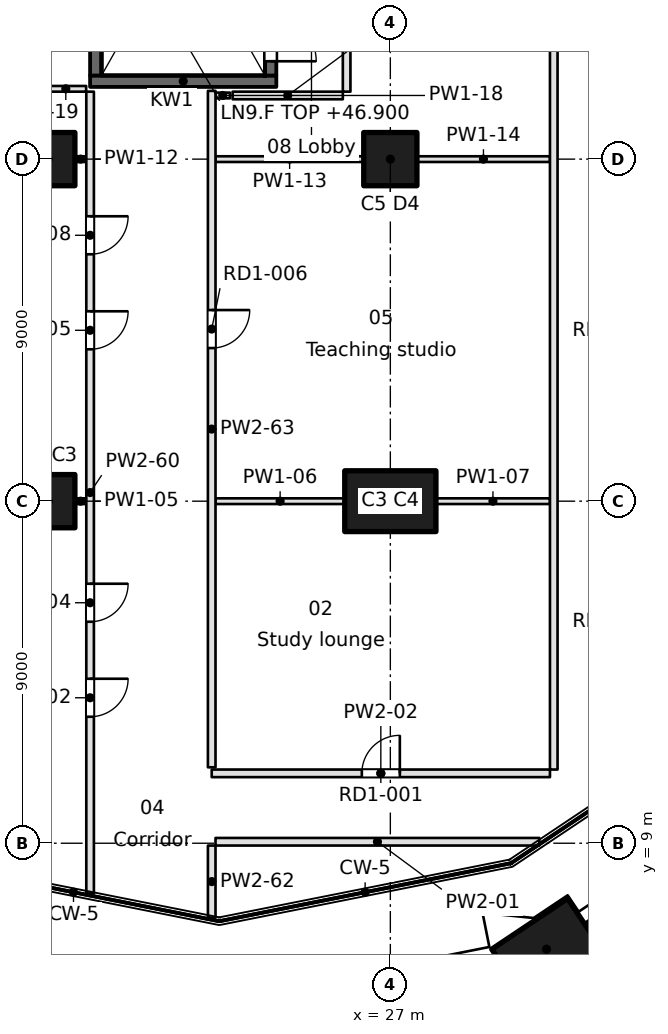
"""IFC4 building model, lengths in metres.
Left out: names, types, materials, properties, quantities, classifications, styles, units other than length and angle.
Written with IfcOpenShell. Run it as: python <this file> out.ifc"""

import sys

from ifc_helpers import new_model, si_unit, direction, frame, frame_2d, origin, origin_2d, place, context, subcontext, project, spatial, rectangle, extrude, element, fill, save


model = new_model("IFC4")
c1 = context("Model", 3, precision=1e-05, world=origin(), true_north=direction((0.0, 1.0)))
c2 = subcontext(c1, "Body", "Model", "MODEL_VIEW")
j1 = project(units=[si_unit("LENGTHUNIT", "METRE"), si_unit("PLANEANGLEUNIT", "RADIAN")], contexts=[c1])
p1 = place(None, origin())
s1 = spatial("IfcSite", under=j1, at=p1, CompositionType="ELEMENT")
p2 = place(p1, origin())
s2 = spatial("IfcBuilding", under=s1, at=p2, CompositionType="ELEMENT")
p3 = place(p2, frame((0.0, 0.0, 46.9)))
s3 = spatial("IfcBuildingStorey", under=s2, at=p3, CompositionType="ELEMENT", Elevation=46.9)
p4 = place(p3, frame((31.11, 6.213, 0.0), z_axis=(0.0, 0.0, 1.0), x_axis=(0.831469612303, 0.55557023302, 0.0)))
e1 = element("IfcColumn", 1, at=p4, inside=s3, PredefinedType="COLUMN", context=c2, shape_type="SweptSolid", body=[
    extrude(rectangle(XDim=2.4, YDim=1.6, at=origin_2d()), origin(), (0.0, 0.0, 1.0), 3.7),
])
for number, where, z_axis, x_axis in (
    (2, (18.0, 18.0, 0.0), (0.0, 0.0, 1.0), (1.0, 0.0, 0.0)),
    (3, (18.0, 27.0, 0.0), (0.0, 0.0, 1.0), (1.0, 0.0, 0.0)),
):
    element("IfcColumn", number, at=place(p3, frame(where, z_axis=z_axis, x_axis=x_axis)), inside=s3, PredefinedType="COLUMN", context=c2, shape_type="SweptSolid", body=[
        extrude(rectangle(XDim=1.4, YDim=1.4, at=origin_2d()), origin(), (0.0, 0.0, 1.0), 3.7),
    ])
p5 = place(p3, frame((27.0, 18.0, 0.0), z_axis=(0.0, 0.0, 1.0), x_axis=(1.0, 0.0, 0.0)))
e4 = element("IfcColumn", 4, at=p5, inside=s3, PredefinedType="COLUMN", context=c2, shape_type="SweptSolid", body=[
    extrude(rectangle(XDim=2.4, YDim=1.6, at=origin_2d()), origin(), (0.0, 0.0, 1.0), 3.7),
])
p6 = place(p3, frame((27.0, 27.0, 0.0), z_axis=(0.0, 0.0, 1.0), x_axis=(1.0, 0.0, 0.0)))
e5 = element("IfcColumn", 5, at=p6, inside=s3, PredefinedType="COLUMN", context=c2, shape_type="SweptSolid", body=[
    extrude(rectangle(XDim=1.4, YDim=1.4, at=origin_2d()), origin(), (0.0, 0.0, 1.0), 3.7),
])
p7 = place(p3, frame((19.1, 29.05, -0.4), z_axis=(0.0, 0.0, 1.0), x_axis=(1.0, 0.0, 0.0)))
e6 = element("IfcWall", 6, at=p7, inside=s3, PredefinedType="SOLIDWALL", context=c2, shape_type="SweptSolid", body=[
    extrude(rectangle(XDim=4.9, YDim=0.3, at=frame_2d((2.45, 0.0))), origin(), (0.0, 0.0, 1.0), 3.7),
])
p8 = place(p3, frame((19.25, 29.2, -0.4), z_axis=(0.0, 0.0, 1.0), x_axis=(0.0, 1.0, 0.0)))
e7 = element("IfcWall", 7, at=p8, inside=s3, PredefinedType="SOLIDWALL", context=c2, shape_type="SweptSolid", body=[
    extrude(rectangle(XDim=7.6, YDim=0.3, at=frame_2d((3.8, 0.0))), origin(), (0.0, 0.0, 1.0), 3.7),
])
p9 = place(p3, frame((23.85, 29.2, -0.4), z_axis=(0.0, 0.0, 1.0), x_axis=(0.0, 1.0, 0.0)))
e8 = element("IfcWall", 8, at=p9, inside=s3, PredefinedType="SOLIDWALL", context=c2, shape_type="SweptSolid", body=[
    extrude(rectangle(XDim=7.6, YDim=0.3, at=frame_2d((3.8, 0.0))), origin(), (0.0, 0.0, 1.0), 3.7),
])
p10 = place(p9, frame((0.375, 0.0, 0.4)))
e9 = element("IfcOpeningElement", 9, at=p10, cuts=e8, PredefinedType="OPENING", context=c2, shape_type="SweptSolid", body=[
    extrude(rectangle(XDim=1.2, YDim=2.1, at=frame_2d((0.6, 1.05))), frame((0.0, 0.15, 0.0), z_axis=(0.0, -1.0, 0.0), x_axis=(1.0, 0.0, 0.0)), (0.0, 0.0, 1.0), 0.3),
])
p11 = place(p3, frame((30.921, 9.039, 0.0), z_axis=(0.0, 0.0, 1.0), x_axis=(-1.0, 0.0, 0.0)))
e10 = element("IfcWall", 10, at=p11, inside=s3, PredefinedType="PARTITIONING", context=c2, shape_type="SweptSolid", body=[
    extrude(rectangle(XDim=8.521, YDim=0.2, at=frame_2d((4.261, 0.0))), origin(), (0.0, 0.0, 1.0), 3.3),
])
p12 = place(p3, frame((22.3, 10.839, 0.0), z_axis=(0.0, 0.0, 1.0), x_axis=(1.0, 0.0, 0.0)))
e11 = element("IfcWall", 11, at=p12, inside=s3, PredefinedType="PARTITIONING", context=c2, shape_type="SweptSolid", body=[
    extrude(rectangle(XDim=8.9, YDim=0.2, at=frame_2d((4.45, 0.0))), origin(), (0.0, 0.0, 1.0), 3.3),
])
p13 = place(p12, frame((3.95, 0.0, 0.0)))
e12 = element("IfcOpeningElement", 12, at=p13, cuts=e11, PredefinedType="OPENING", context=c2, shape_type="SweptSolid", body=[
    extrude(rectangle(XDim=1.0, YDim=2.1, at=frame_2d((0.5, 1.05))), frame((0.0, 0.1, 0.0), z_axis=(0.0, -1.0, 0.0), x_axis=(1.0, 0.0, 0.0)), (0.0, 0.0, 1.0), 0.2),
])
p14 = place(p3, frame((18.7, 18.0, 0.0), z_axis=(0.0, 0.0, 1.0), x_axis=(1.0, 0.0, 0.0)))
e13 = element("IfcWall", 13, at=p14, inside=s3, PredefinedType="PARTITIONING", context=c2, shape_type="SweptSolid", body=[
    extrude(rectangle(XDim=0.3, YDim=0.15, at=frame_2d((0.15, 0.0))), origin(), (0.0, 0.0, 1.0), 3.3),
])
p15 = place(p3, frame((22.4, 18.0, 0.0), z_axis=(0.0, 0.0, 1.0), x_axis=(1.0, 0.0, 0.0)))
e14 = element("IfcWall", 14, at=p15, inside=s3, PredefinedType="PARTITIONING", context=c2, shape_type="SweptSolid", body=[
    extrude(rectangle(XDim=3.4, YDim=0.15, at=frame_2d((1.7, 0.0))), origin(), (0.0, 0.0, 1.0), 3.3),
])
p16 = place(p3, frame((28.2, 18.0, 0.0), z_axis=(0.0, 0.0, 1.0), x_axis=(1.0, 0.0, 0.0)))
e15 = element("IfcWall", 15, at=p16, inside=s3, PredefinedType="PARTITIONING", context=c2, shape_type="SweptSolid", body=[
    extrude(rectangle(XDim=3.0, YDim=0.15, at=frame_2d((1.5, 0.0))), origin(), (0.0, 0.0, 1.0), 3.3),
])
p17 = place(p3, frame((18.7, 27.0, 0.0), z_axis=(0.0, 0.0, 1.0), x_axis=(1.0, 0.0, 0.0)))
e16 = element("IfcWall", 16, at=p17, inside=s3, PredefinedType="PARTITIONING", context=c2, shape_type="SweptSolid", body=[
    extrude(rectangle(XDim=0.3, YDim=0.15, at=frame_2d((0.15, 0.0))), origin(), (0.0, 0.0, 1.0), 3.3),
])
p18 = place(p3, frame((22.4, 27.0, 0.0), z_axis=(0.0, 0.0, 1.0), x_axis=(1.0, 0.0, 0.0)))
e17 = element("IfcWall", 17, at=p18, inside=s3, PredefinedType="PARTITIONING", context=c2, shape_type="SweptSolid", body=[
    extrude(rectangle(XDim=3.9, YDim=0.15, at=frame_2d((1.95, 0.0))), origin(), (0.0, 0.0, 1.0), 3.3),
])
p19 = place(p3, frame((27.7, 27.0, 0.0), z_axis=(0.0, 0.0, 1.0), x_axis=(1.0, 0.0, 0.0)))
e18 = element("IfcWall", 18, at=p19, inside=s3, PredefinedType="PARTITIONING", context=c2, shape_type="SweptSolid", body=[
    extrude(rectangle(XDim=3.5, YDim=0.15, at=frame_2d((1.75, 0.0))), origin(), (0.0, 0.0, 1.0), 3.3),
])
p20 = place(p3, frame((25.75, 28.675, 0.0), z_axis=(0.0, 0.0, 1.0), x_axis=(-1.0, 0.0, 0.0)))
e19 = element("IfcWall", 19, at=p20, inside=s3, PredefinedType="PARTITIONING", context=c2, shape_type="SweptSolid", body=[
    extrude(rectangle(XDim=2.9, YDim=0.2, at=frame_2d((1.45, 0.0))), origin(), (0.0, 0.0, 1.0), 3.3),
])
p21 = place(p3, frame((22.4, 28.675, 0.0), z_axis=(0.0, 0.0, 1.0), x_axis=(1.0, 0.0, 0.0)))
e20 = element("IfcWall", 20, at=p21, inside=s3, PredefinedType="PARTITIONING", context=c2, shape_type="SweptSolid", body=[
    extrude(rectangle(XDim=0.38, YDim=0.15, at=frame_2d((0.19, 0.0))), origin(), (0.0, 0.0, 1.0), 3.3),
])
p22 = place(p3, frame((17.925, 28.85, 0.0), z_axis=(0.0, 0.0, 1.0), x_axis=(1.0, 0.0, 0.0)))
e21 = element("IfcWall", 21, at=p22, inside=s3, PredefinedType="PARTITIONING", context=c2, shape_type="SweptSolid", body=[
    extrude(rectangle(XDim=1.071, YDim=0.15, at=frame_2d((0.536, 0.0))), origin(), (0.0, 0.0, 1.0), 3.3),
])
p23 = place(p3, frame((19.1, 7.679, 0.0), z_axis=(0.0, 0.0, 1.0), x_axis=(0.0, 1.0, 0.0)))
e22 = element("IfcWall", 22, at=p23, inside=s3, PredefinedType="PARTITIONING", context=c2, shape_type="SweptSolid", body=[
    extrude(rectangle(XDim=21.095, YDim=0.2, at=frame_2d((10.548, 0.0))), origin(), (0.0, 0.0, 1.0), 3.3),
])
p24 = place(p23, frame((4.648, 0.0, 0.0)))
e23 = element("IfcOpeningElement", 23, at=p24, cuts=e22, PredefinedType="OPENING", context=c2, shape_type="SweptSolid", body=[
    extrude(rectangle(XDim=1.0, YDim=2.1, at=frame_2d((0.5, 1.05))), frame((0.0, 0.1, 0.0), z_axis=(0.0, -1.0, 0.0), x_axis=(1.0, 0.0, 0.0)), (0.0, 0.0, 1.0), 0.2),
])
p25 = place(p23, frame((7.148, 0.0, 0.0)))
e24 = element("IfcOpeningElement", 24, at=p25, cuts=e22, PredefinedType="OPENING", context=c2, shape_type="SweptSolid", body=[
    extrude(rectangle(XDim=1.0, YDim=2.1, at=frame_2d((0.5, 1.05))), frame((0.0, 0.1, 0.0), z_axis=(0.0, -1.0, 0.0), x_axis=(1.0, 0.0, 0.0)), (0.0, 0.0, 1.0), 0.2),
])
p26 = place(p23, frame((14.317, 0.0, 0.0)))
e25 = element("IfcOpeningElement", 25, at=p26, cuts=e22, PredefinedType="OPENING", context=c2, shape_type="SweptSolid", body=[
    extrude(rectangle(XDim=1.0, YDim=2.1, at=frame_2d((0.5, 1.05))), frame((0.0, 0.1, 0.0), z_axis=(0.0, -1.0, 0.0), x_axis=(1.0, 0.0, 0.0)), (0.0, 0.0, 1.0), 0.2),
])
p27 = place(p23, frame((16.817, 0.0, 0.0)))
e26 = element("IfcOpeningElement", 26, at=p27, cuts=e22, PredefinedType="OPENING", context=c2, shape_type="SweptSolid", body=[
    extrude(rectangle(XDim=1.0, YDim=2.1, at=frame_2d((0.5, 1.05))), frame((0.0, 0.1, 0.0), z_axis=(0.0, -1.0, 0.0), x_axis=(1.0, 0.0, 0.0)), (0.0, 0.0, 1.0), 0.2),
])
p28 = place(p3, frame((22.3, 8.939, 0.0), z_axis=(0.0, 0.0, 1.0), x_axis=(0.0, -1.0, 0.0)))
e27 = element("IfcWall", 27, at=p28, inside=s3, PredefinedType="PARTITIONING", context=c2, shape_type="SweptSolid", body=[
    extrude(rectangle(XDim=1.896, YDim=0.2, at=frame_2d((0.948, 0.0))), origin(), (0.0, 0.0, 1.0), 3.3),
])
p29 = place(p3, frame((22.3, 28.796, 0.0), z_axis=(0.0, 0.0, 1.0), x_axis=(0.0, -1.0, 0.0)))
e28 = element("IfcWall", 28, at=p29, inside=s3, PredefinedType="PARTITIONING", context=c2, shape_type="SweptSolid", body=[
    extrude(rectangle(XDim=17.798, YDim=0.2, at=frame_2d((8.899, 0.0))), origin(), (0.0, 0.0, 1.0), 3.3),
])
p30 = place(p29, frame((5.767, 0.0, 0.0)))
e29 = element("IfcOpeningElement", 29, at=p30, cuts=e28, PredefinedType="OPENING", context=c2, shape_type="SweptSolid", body=[
    extrude(rectangle(XDim=1.0, YDim=2.1, at=frame_2d((0.5, 1.05))), frame((0.0, 0.1, 0.0), z_axis=(0.0, -1.0, 0.0), x_axis=(1.0, 0.0, 0.0)), (0.0, 0.0, 1.0), 0.2),
])
p31 = place(p3, frame((25.85, 31.575, 0.0), z_axis=(0.0, 0.0, 1.0), x_axis=(0.0, -1.0, 0.0)))
e30 = element("IfcWall", 30, at=p31, inside=s3, PredefinedType="PARTITIONING", context=c2, shape_type="SweptSolid", body=[
    extrude(rectangle(XDim=2.8, YDim=0.2, at=frame_2d((1.4, 0.0))), origin(), (0.0, 0.0, 1.0), 3.3),
])
p32 = place(p3, frame((31.3, 10.939, 0.0), z_axis=(0.0, 0.0, 1.0), x_axis=(0.0, 1.0, 0.0)))
e31 = element("IfcWall", 31, at=p32, inside=s3, PredefinedType="PARTITIONING", context=c2, shape_type="SweptSolid", body=[
    extrude(rectangle(XDim=48.861, YDim=0.2, at=frame_2d((24.431, 0.0))), origin(), (0.0, 0.0, 1.0), 3.3),
])
p33 = place(p32, frame((20.047, 0.0, 0.0)))
e32 = element("IfcOpeningElement", 32, at=p33, cuts=e31, PredefinedType="OPENING", context=c2, shape_type="SweptSolid", body=[
    extrude(rectangle(XDim=1.0, YDim=2.1, at=frame_2d((0.5, 1.05))), frame((0.0, 0.1, 0.0), z_axis=(0.0, -1.0, 0.0), x_axis=(1.0, 0.0, 0.0)), (0.0, 0.0, 1.0), 0.2),
])
p34 = place(p32, frame((29.067, 0.0, 0.0)))
e33 = element("IfcOpeningElement", 33, at=p34, cuts=e31, PredefinedType="OPENING", context=c2, shape_type="SweptSolid", body=[
    extrude(rectangle(XDim=1.0, YDim=2.1, at=frame_2d((0.5, 1.05))), frame((0.0, 0.1, 0.0), z_axis=(0.0, -1.0, 0.0), x_axis=(1.0, 0.0, 0.0)), (0.0, 0.0, 1.0), 0.2),
])
p35 = place(p10, frame((1.2, 0.0, 0.0), z_axis=(0.0, 0.0, 1.0), x_axis=(-1.0, 0.0, 0.0)))
e34 = element("IfcDoor", 34, at=p35, inside=s3, OperationType="SINGLE_SWING_RIGHT", PredefinedType="DOOR", context=c2, shape_type="SweptSolid", body=[
    extrude(rectangle(XDim=1.2, YDim=2.1, at=frame_2d((0.6, 1.05))), frame((0.0, 0.025, 0.0), z_axis=(0.0, -1.0, 0.0), x_axis=(1.0, 0.0, 0.0)), (0.0, 0.0, 1.0), 0.05),
])
fill(e9, e34)
p36 = place(p13, origin())
e35 = element("IfcDoor", 35, at=p36, inside=s3, OperationType="SINGLE_SWING_RIGHT", PredefinedType="DOOR", context=c2, shape_type="SweptSolid", body=[
    extrude(rectangle(XDim=1.0, YDim=2.1, at=frame_2d((0.5, 1.05))), frame((0.0, 0.025, 0.0), z_axis=(0.0, -1.0, 0.0), x_axis=(1.0, 0.0, 0.0)), (0.0, 0.0, 1.0), 0.05),
])
fill(e12, e35)
p37 = place(p24, frame((1.0, 0.0, 0.0), z_axis=(0.0, 0.0, 1.0), x_axis=(-1.0, 0.0, 0.0)))
e36 = element("IfcDoor", 36, at=p37, inside=s3, OperationType="SINGLE_SWING_LEFT", PredefinedType="DOOR", context=c2, shape_type="SweptSolid", body=[
    extrude(rectangle(XDim=1.0, YDim=2.1, at=frame_2d((0.5, 1.05))), frame((0.0, 0.025, 0.0), z_axis=(0.0, -1.0, 0.0), x_axis=(1.0, 0.0, 0.0)), (0.0, 0.0, 1.0), 0.05),
])
fill(e23, e36)
p38 = place(p25, frame((1.0, 0.0, 0.0), z_axis=(0.0, 0.0, 1.0), x_axis=(-1.0, 0.0, 0.0)))
e37 = element("IfcDoor", 37, at=p38, inside=s3, OperationType="SINGLE_SWING_LEFT", PredefinedType="DOOR", context=c2, shape_type="SweptSolid", body=[
    extrude(rectangle(XDim=1.0, YDim=2.1, at=frame_2d((0.5, 1.05))), frame((0.0, 0.025, 0.0), z_axis=(0.0, -1.0, 0.0), x_axis=(1.0, 0.0, 0.0)), (0.0, 0.0, 1.0), 0.05),
])
fill(e24, e37)
p39 = place(p26, frame((1.0, 0.0, 0.0), z_axis=(0.0, 0.0, 1.0), x_axis=(-1.0, 0.0, 0.0)))
e38 = element("IfcDoor", 38, at=p39, inside=s3, OperationType="SINGLE_SWING_LEFT", PredefinedType="DOOR", context=c2, shape_type="SweptSolid", body=[
    extrude(rectangle(XDim=1.0, YDim=2.1, at=frame_2d((0.5, 1.05))), frame((0.0, 0.025, 0.0), z_axis=(0.0, -1.0, 0.0), x_axis=(1.0, 0.0, 0.0)), (0.0, 0.0, 1.0), 0.05),
])
fill(e25, e38)
p40 = place(p30, origin())
e39 = element("IfcDoor", 39, at=p40, inside=s3, OperationType="SINGLE_SWING_LEFT", PredefinedType="DOOR", context=c2, shape_type="SweptSolid", body=[
    extrude(rectangle(XDim=1.0, YDim=2.1, at=frame_2d((0.5, 1.05))), frame((0.0, 0.025, 0.0), z_axis=(0.0, -1.0, 0.0), x_axis=(1.0, 0.0, 0.0)), (0.0, 0.0, 1.0), 0.05),
])
fill(e29, e39)
p41 = place(p27, frame((1.0, 0.0, 0.0), z_axis=(0.0, 0.0, 1.0), x_axis=(-1.0, 0.0, 0.0)))
e40 = element("IfcDoor", 40, at=p41, inside=s3, OperationType="SINGLE_SWING_LEFT", PredefinedType="DOOR", context=c2, shape_type="SweptSolid", body=[
    extrude(rectangle(XDim=1.0, YDim=2.1, at=frame_2d((0.5, 1.05))), frame((0.0, 0.025, 0.0), z_axis=(0.0, -1.0, 0.0), x_axis=(1.0, 0.0, 0.0)), (0.0, 0.0, 1.0), 0.05),
])
fill(e26, e40)
save(model, sys.argv[1])
